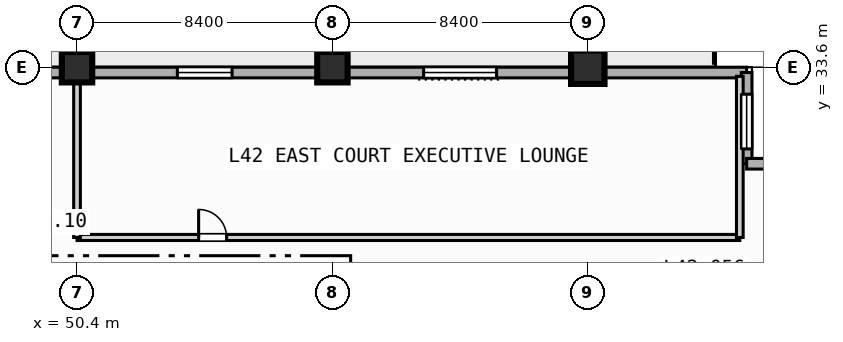
"""IFC4 building model, lengths in metres.
Left out: names, types, materials, properties, quantities, classifications, styles, units other than length and angle.
Written with IfcOpenShell. Run it as: python <this file> out.ifc"""

import sys

from ifc_helpers import new_model, si_unit, direction, frame, frame_2d, origin, origin_2d, place, context, subcontext, project, spatial, rectangle, extrude, element, fill, save


model = new_model("IFC4")
c1 = context("Model", 3, precision=1e-05, world=origin(), true_north=direction((0.0, 1.0)))
c2 = subcontext(c1, "Body", "Model", "MODEL_VIEW")
j1 = project(units=[si_unit("LENGTHUNIT", "METRE"), si_unit("PLANEANGLEUNIT", "RADIAN")], contexts=[c1])
p1 = place(None, origin())
s1 = spatial("IfcSite", under=j1, at=p1, CompositionType="ELEMENT")
p2 = place(p1, origin())
s2 = spatial("IfcBuilding", under=s1, at=p2, CompositionType="ELEMENT")
p3 = place(p2, frame((0.0, 0.0, 175.4)))
s3 = spatial("IfcBuildingStorey", under=s2, at=p3, CompositionType="ELEMENT", Elevation=175.4)
for number, where, z_axis, x_axis in (
    (1, (50.4, 33.6, 0.0), (0.0, 0.0, 1.0), (1.0, 0.0, 0.0)),
    (2, (58.8, 33.6, 0.0), (0.0, 0.0, 1.0), (1.0, 0.0, 0.0)),
):
    element("IfcColumn", number, at=place(p3, frame(where, z_axis=z_axis, x_axis=x_axis)), inside=s3, PredefinedType="COLUMN", context=c2, shape_type="SweptSolid", body=[
        extrude(rectangle(XDim=1.0, YDim=1.0, at=origin_2d()), origin(), (0.0, 0.0, 1.0), 3.7),
    ])
p4 = place(p3, frame((67.2, 33.6, 0.0), z_axis=(0.0, 0.0, 1.0), x_axis=(1.0, 0.0, 0.0)))
e3 = element("IfcColumn", 3, at=p4, inside=s3, PredefinedType="COLUMN", context=c2, shape_type="SweptSolid", body=[
    extrude(rectangle(XDim=1.1, YDim=1.1, at=origin_2d()), origin(), (0.0, 0.0, 1.0), 3.7),
])
p5 = place(p3, frame((33.425, 33.425, 0.0), z_axis=(0.0, 0.0, 1.0), x_axis=(1.0, 0.0, 0.0)))
e4 = element("IfcWall", 4, at=p5, inside=s3, PredefinedType="STANDARD", context=c2, shape_type="SweptSolid", body=[
    extrude(rectangle(XDim=39.0, YDim=0.35, at=frame_2d((19.5, 0.0))), origin(), (0.0, 0.0, 1.0), 3.47),
])
p6 = place(p5, frame((12.075, 0.0, 0.0)))
e5 = element("IfcOpeningElement", 5, at=p6, cuts=e4, PredefinedType="OPENING", context=c2, shape_type="SweptSolid", body=[
    extrude(rectangle(XDim=1.4, YDim=2.2, at=frame_2d((0.7, 1.1))), frame((0.0, 0.185, 0.0), z_axis=(0.0, -1.0, 0.0), x_axis=(1.0, 0.0, 0.0)), (0.0, 0.0, 1.0), 0.37),
])
p7 = place(p5, frame((20.275, 0.0, 0.85)))
e6 = element("IfcOpeningElement", 6, at=p7, cuts=e4, PredefinedType="OPENING", context=c2, shape_type="SweptSolid", body=[
    extrude(rectangle(XDim=1.8, YDim=1.8, at=frame_2d((0.9, 0.9))), frame((0.0, 0.185, 0.0), z_axis=(0.0, -1.0, 0.0), x_axis=(1.0, 0.0, 0.0)), (0.0, 0.0, 1.0), 0.37),
])
p8 = place(p5, frame((28.375, 0.0, 0.85)))
e7 = element("IfcOpeningElement", 7, at=p8, cuts=e4, PredefinedType="OPENING", context=c2, shape_type="SweptSolid", body=[
    extrude(rectangle(XDim=2.4, YDim=1.95, at=frame_2d((1.2, 0.975))), frame((0.0, 0.185, 0.0), z_axis=(0.0, -1.0, 0.0), x_axis=(1.0, 0.0, 0.0)), (0.0, 0.0, 1.0), 0.37),
])
p9 = place(p3, frame((72.425, 33.425, 0.0), z_axis=(0.0, 0.0, 1.0), x_axis=(0.0, -1.0, 0.0)))
e8 = element("IfcWall", 8, at=p9, inside=s3, PredefinedType="STANDARD", context=c2, shape_type="SweptSolid", body=[
    extrude(rectangle(XDim=3.0, YDim=0.35, at=frame_2d((1.5, 0.0))), origin(), (0.0, 0.0, 1.0), 3.47),
])
p10 = place(p9, frame((0.712, 0.0, 0.85)))
e9 = element("IfcOpeningElement", 9, at=p10, cuts=e8, PredefinedType="OPENING", context=c2, shape_type="SweptSolid", body=[
    extrude(rectangle(XDim=1.8, YDim=1.8, at=frame_2d((0.9, 0.9))), frame((0.0, 0.185, 0.0), z_axis=(0.0, -1.0, 0.0), x_axis=(1.0, 0.0, 0.0)), (0.0, 0.0, 1.0), 0.37),
])
p11 = place(p3, frame((72.425, 30.425, 0.0), z_axis=(0.0, 0.0, 1.0), x_axis=(1.0, 0.0, 0.0)))
e10 = element("IfcWall", 10, at=p11, inside=s3, PredefinedType="STANDARD", context=c2, shape_type="SweptSolid", body=[
    extrude(rectangle(XDim=3.0, YDim=0.35, at=frame_2d((1.5, 0.0))), origin(), (0.0, 0.0, 1.0), 3.47),
])
p12 = place(p3, frame((50.4, 28.0, 0.0), z_axis=(0.0, 0.0, 1.0), x_axis=(1.0, 0.0, 0.0)))
e11 = element("IfcWall", 11, at=p12, inside=s3, PredefinedType="PARTITIONING", context=c2, shape_type="SweptSolid", body=[
    extrude(rectangle(XDim=21.8, YDim=0.2, at=frame_2d((10.9, 0.0))), origin(), (0.0, 0.0, 1.0), 3.47),
])
p13 = place(p12, frame((4.0, 0.0, 0.0)))
e12 = element("IfcOpeningElement", 12, at=p13, cuts=e11, PredefinedType="OPENING", context=c2, shape_type="SweptSolid", body=[
    extrude(rectangle(XDim=0.92, YDim=2.1, at=frame_2d((0.46, 1.05))), frame((0.0, 0.11, 0.0), z_axis=(0.0, -1.0, 0.0), x_axis=(1.0, 0.0, 0.0)), (0.0, 0.0, 1.0), 0.22),
])
p14 = place(p3, frame((50.4, 28.0, 0.0), z_axis=(0.0, 0.0, 1.0), x_axis=(0.0, 1.0, 0.0)))
e13 = element("IfcWall", 13, at=p14, inside=s3, PredefinedType="PARTITIONING", context=c2, shape_type="SweptSolid", body=[
    extrude(rectangle(XDim=5.3, YDim=0.22, at=frame_2d((2.65, 0.0))), origin(), (0.0, 0.0, 1.0), 2.82),
])
p15 = place(p3, frame((72.2, 28.0, 0.0), z_axis=(0.0, 0.0, 1.0), x_axis=(0.0, 1.0, 0.0)))
e14 = element("IfcWall", 14, at=p15, inside=s3, PredefinedType="PARTITIONING", context=c2, shape_type="SweptSolid", body=[
    extrude(rectangle(XDim=5.3, YDim=0.22, at=frame_2d((2.65, 0.0))), origin(), (0.0, 0.0, 1.0), 3.47),
])
p16 = place(p7, origin())
e15 = element("IfcWindow", 15, at=p16, inside=s3, PartitioningType="SINGLE_PANEL", PredefinedType="WINDOW", context=c2, shape_type="SweptSolid", body=[
    extrude(rectangle(XDim=1.8, YDim=1.8, at=frame_2d((0.9, 0.9))), frame((0.0, 0.03, 0.0), z_axis=(0.0, -1.0, 0.0), x_axis=(1.0, 0.0, 0.0)), (0.0, 0.0, 1.0), 0.06),
])
fill(e6, e15)
p17 = place(p8, origin())
e16 = element("IfcWindow", 16, at=p17, inside=s3, PartitioningType="SINGLE_PANEL", PredefinedType="WINDOW", context=c2, shape_type="SweptSolid", body=[
    extrude(rectangle(XDim=2.4, YDim=1.95, at=frame_2d((1.2, 0.975))), frame((0.0, 0.03, 0.0), z_axis=(0.0, -1.0, 0.0), x_axis=(1.0, 0.0, 0.0)), (0.0, 0.0, 1.0), 0.06),
])
fill(e7, e16)
p18 = place(p10, origin())
e17 = element("IfcWindow", 17, at=p18, inside=s3, PartitioningType="SINGLE_PANEL", PredefinedType="WINDOW", context=c2, shape_type="SweptSolid", body=[
    extrude(rectangle(XDim=1.8, YDim=1.8, at=frame_2d((0.9, 0.9))), frame((0.0, 0.03, 0.0), z_axis=(0.0, -1.0, 0.0), x_axis=(1.0, 0.0, 0.0)), (0.0, 0.0, 1.0), 0.06),
])
fill(e9, e17)
p19 = place(p13, origin())
e18 = element("IfcDoor", 18, at=p19, inside=s3, OperationType="SINGLE_SWING_LEFT", PredefinedType="DOOR", context=c2, shape_type="SweptSolid", body=[
    extrude(rectangle(XDim=0.92, YDim=2.1, at=frame_2d((0.46, 1.05))), frame((0.0, 0.025, 0.0), z_axis=(0.0, -1.0, 0.0), x_axis=(1.0, 0.0, 0.0)), (0.0, 0.0, 1.0), 0.05),
])
fill(e12, e18)
save(model, sys.argv[1])
